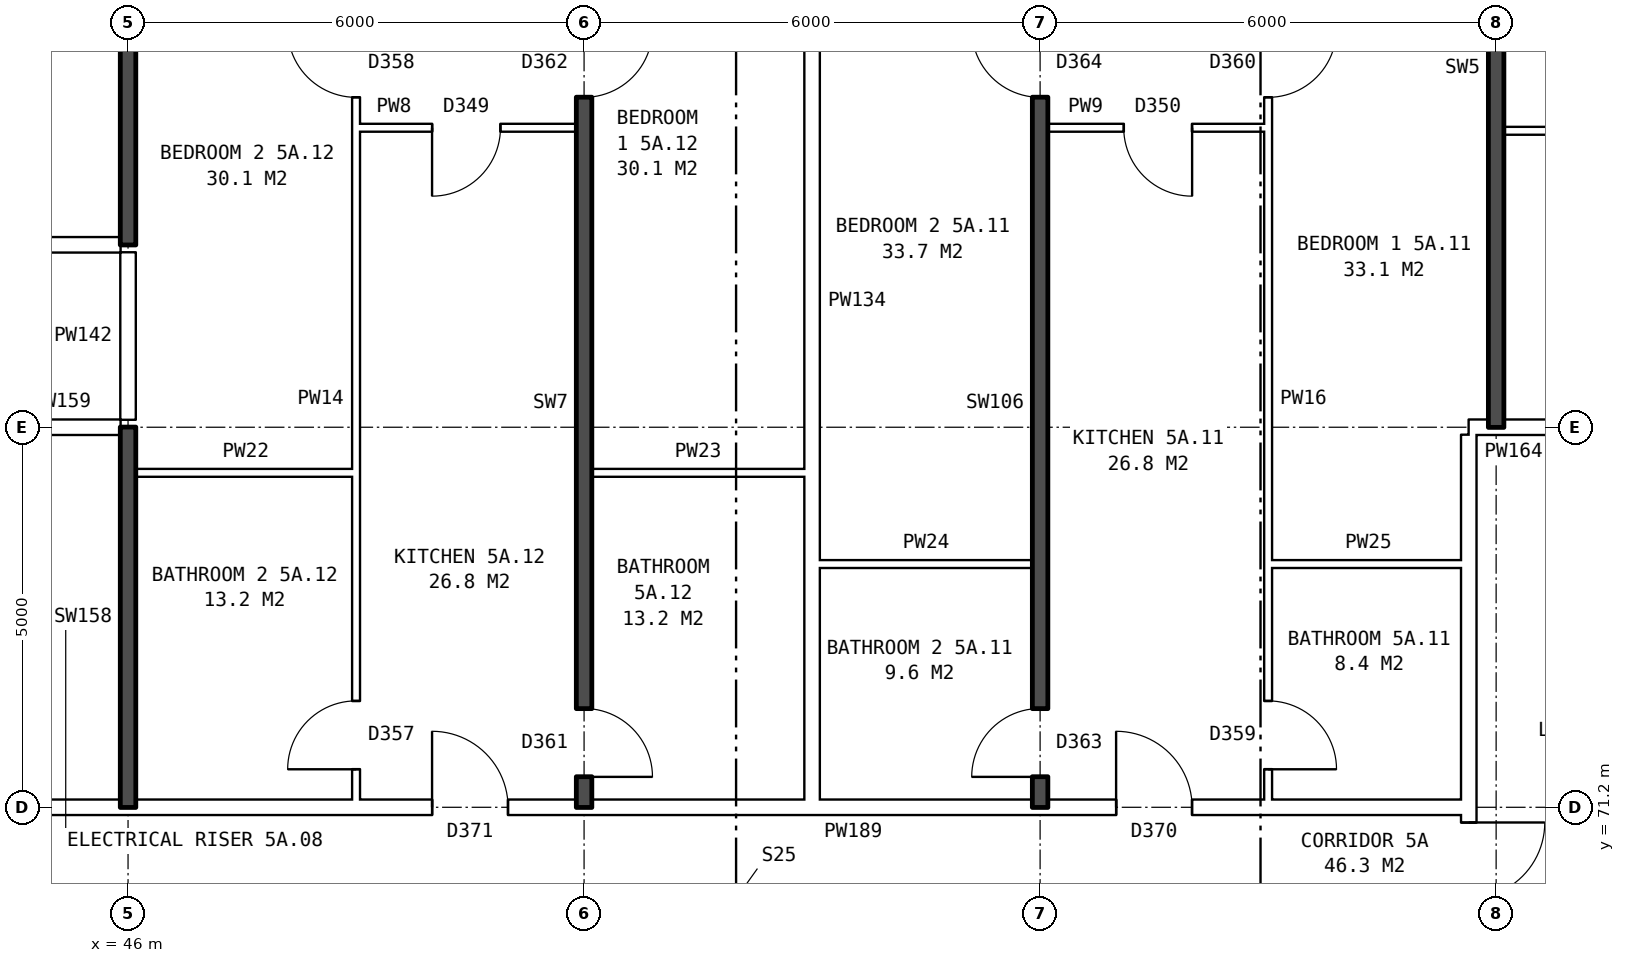
"""IFC4 building model, lengths in metres.
Left out: names, types, materials, properties, quantities, classifications, styles, units other than length and angle.
Written with IfcOpenShell. Run it as: python <this file> out.ifc"""

import sys

from ifc_helpers import new_model, si_unit, direction, frame, frame_2d, origin, place, context, subcontext, project, spatial, rectangle, extrude, element, fill, save


model = new_model("IFC4")
c1 = context("Model", 3, precision=1e-05, world=origin(), true_north=direction((0.0, 1.0)))
c2 = subcontext(c1, "Body", "Model", "MODEL_VIEW")
j1 = project(units=[si_unit("LENGTHUNIT", "METRE"), si_unit("PLANEANGLEUNIT", "RADIAN")], contexts=[c1])
p1 = place(None, origin())
s1 = spatial("IfcSite", under=j1, at=p1, CompositionType="ELEMENT")
p2 = place(p1, origin())
s2 = spatial("IfcBuilding", under=s1, at=p2, CompositionType="ELEMENT")
p3 = place(p2, frame((0.0, 0.0, 22.6)))
s3 = spatial("IfcBuildingStorey", under=s2, at=p3, CompositionType="ELEMENT", Elevation=22.6)
p4 = place(p3, frame((63.64, 63.9, 0.0), z_axis=(0.0, 0.0, 1.0), x_axis=(0.0, 1.0, 0.0)))
e1 = element("IfcWall", 1, at=p4, inside=s3, PredefinedType="PARTITIONING", context=c2, shape_type="SweptSolid", body=[
    extrude(rectangle(XDim=12.2, YDim=0.2, at=frame_2d((6.1, 0.0))), origin(), (0.0, 0.0, 1.0), 2.85),
])
p5 = place(p4, frame((5.1, 0.0, 0.0)))
e2 = element("IfcOpeningElement", 2, at=p5, cuts=e1, PredefinedType="OPENING", context=c2, shape_type="SweptSolid", body=[
    extrude(rectangle(XDim=2.0, YDim=2.1, at=frame_2d((1.0, 1.05))), frame((0.0, 0.11, 0.0), z_axis=(0.0, -1.0, 0.0), x_axis=(1.0, 0.0, 0.0)), (0.0, 0.0, 1.0), 0.22),
])
p6 = place(p3, frame((44.36, 71.2, 0.0), z_axis=(0.0, 0.0, 1.0), x_axis=(1.0, 0.0, 0.0)))
e3 = element("IfcWall", 3, at=p6, inside=s3, PredefinedType="PARTITIONING", context=c2, shape_type="SweptSolid", body=[
    extrude(rectangle(XDim=19.28, YDim=0.2, at=frame_2d((9.64, 0.0))), origin(), (0.0, 0.0, 1.0), 2.85),
])
p7 = place(p6, frame((14.64, 0.0, 0.0)))
e4 = element("IfcOpeningElement", 4, at=p7, cuts=e3, PredefinedType="OPENING", context=c2, shape_type="SweptSolid", body=[
    extrude(rectangle(XDim=1.0, YDim=2.1, at=frame_2d((0.5, 1.05))), frame((0.0, 0.11, 0.0), z_axis=(0.0, -1.0, 0.0), x_axis=(1.0, 0.0, 0.0)), (0.0, 0.0, 1.0), 0.22),
])
p8 = place(p6, frame((5.64, 0.0, 0.0)))
e5 = element("IfcOpeningElement", 5, at=p8, cuts=e3, PredefinedType="OPENING", context=c2, shape_type="SweptSolid", body=[
    extrude(rectangle(XDim=1.0, YDim=2.1, at=frame_2d((0.5, 1.05))), frame((0.0, 0.11, 0.0), z_axis=(0.0, -1.0, 0.0), x_axis=(1.0, 0.0, 0.0)), (0.0, 0.0, 1.0), 0.22),
])
p9 = place(p3, frame((55.1, 74.4, 0.0), z_axis=(0.0, 0.0, 1.0), x_axis=(1.0, 0.0, 0.0)))
e6 = element("IfcWall", 6, at=p9, inside=s3, PredefinedType="PARTITIONING", context=c2, shape_type="SweptSolid", body=[
    extrude(rectangle(XDim=2.8, YDim=0.1, at=frame_2d((1.4, 0.0))), origin(), (0.0, 0.0, 1.0), 2.85),
])
p10 = place(p3, frame((61.0, 74.4, 0.0), z_axis=(0.0, 0.0, 1.0), x_axis=(1.0, 0.0, 0.0)))
e7 = element("IfcWall", 7, at=p10, inside=s3, PredefinedType="PARTITIONING", context=c2, shape_type="SweptSolid", body=[
    extrude(rectangle(XDim=2.64, YDim=0.1, at=frame_2d((1.32, 0.0))), origin(), (0.0, 0.0, 1.0), 2.85),
])
p11 = place(p3, frame((46.1, 75.6, 0.0), z_axis=(0.0, 0.0, 1.0), x_axis=(1.0, 0.0, 0.0)))
e8 = element("IfcWall", 8, at=p11, inside=s3, PredefinedType="PARTITIONING", context=c2, shape_type="SweptSolid", body=[
    extrude(rectangle(XDim=2.9, YDim=0.1, at=frame_2d((1.45, 0.0))), origin(), (0.0, 0.0, 1.0), 2.85),
])
p12 = place(p3, frame((52.1, 75.6, 0.0), z_axis=(0.0, 0.0, 1.0), x_axis=(1.0, 0.0, 0.0)))
e9 = element("IfcWall", 9, at=p12, inside=s3, PredefinedType="PARTITIONING", context=c2, shape_type="SweptSolid", body=[
    extrude(rectangle(XDim=2.8, YDim=0.1, at=frame_2d((1.4, 0.0))), origin(), (0.0, 0.0, 1.0), 2.85),
])
p13 = place(p3, frame((44.36, 76.2, 0.0), z_axis=(0.0, 0.0, 1.0), x_axis=(1.0, 0.0, 0.0)))
e10 = element("IfcWall", 10, at=p13, inside=s3, PredefinedType="PARTITIONING", context=c2, shape_type="SweptSolid", body=[
    extrude(rectangle(XDim=1.54, YDim=0.2, at=frame_2d((0.77, 0.0))), origin(), (0.0, 0.0, 1.0), 2.85),
])
p14 = place(p3, frame((63.64, 76.2, 0.0), z_axis=(0.0, 0.0, 1.0), x_axis=(1.0, 0.0, 0.0)))
e11 = element("IfcWall", 11, at=p14, inside=s3, PredefinedType="PARTITIONING", context=c2, shape_type="SweptSolid", body=[
    extrude(rectangle(XDim=3.0, YDim=0.2, at=frame_2d((1.5, 0.0))), origin(), (0.0, 0.0, 1.0), 2.85),
])
p15 = place(p14, frame((1.18, 0.0, 0.0)))
e12 = element("IfcOpeningElement", 12, at=p15, cuts=e11, PredefinedType="OPENING", context=c2, shape_type="SweptSolid", body=[
    extrude(rectangle(XDim=1.0, YDim=2.1, at=frame_2d((0.5, 1.05))), frame((0.0, 0.11, 0.0), z_axis=(0.0, -1.0, 0.0), x_axis=(1.0, 0.0, 0.0)), (0.0, 0.0, 1.0), 0.22),
])
p16 = place(p3, frame((20.11, 78.6, 0.0), z_axis=(0.0, 0.0, 1.0), x_axis=(1.0, 0.0, 0.0)))
e13 = element("IfcWall", 13, at=p16, inside=s3, PredefinedType="PARTITIONING", context=c2, shape_type="SweptSolid", body=[
    extrude(rectangle(XDim=25.79, YDim=0.2, at=frame_2d((12.895, 0.0))), origin(), (0.0, 0.0, 1.0), 2.85),
])
p17 = place(p16, frame((22.34, 0.0, 0.0)))
e14 = element("IfcOpeningElement", 14, at=p17, cuts=e13, PredefinedType="OPENING", context=c2, shape_type="SweptSolid", body=[
    extrude(rectangle(XDim=1.0, YDim=2.1, at=frame_2d((0.5, 1.05))), frame((0.0, 0.11, 0.0), z_axis=(0.0, -1.0, 0.0), x_axis=(1.0, 0.0, 0.0)), (0.0, 0.0, 1.0), 0.22),
])
p18 = place(p16, frame((10.39, 0.0, 0.0)))
e15 = element("IfcOpeningElement", 15, at=p18, cuts=e13, PredefinedType="OPENING", context=c2, shape_type="SweptSolid", body=[
    extrude(rectangle(XDim=1.0, YDim=2.1, at=frame_2d((0.5, 1.05))), frame((0.0, 0.11, 0.0), z_axis=(0.0, -1.0, 0.0), x_axis=(1.0, 0.0, 0.0)), (0.0, 0.0, 1.0), 0.22),
])
p19 = place(p16, frame((2.245, 0.0, 0.0)))
e16 = element("IfcOpeningElement", 16, at=p19, cuts=e13, PredefinedType="OPENING", context=c2, shape_type="SweptSolid", body=[
    extrude(rectangle(XDim=1.0, YDim=2.1, at=frame_2d((0.5, 1.05))), frame((0.0, 0.11, 0.0), z_axis=(0.0, -1.0, 0.0), x_axis=(1.0, 0.0, 0.0)), (0.0, 0.0, 1.0), 0.22),
])
p20 = place(p3, frame((64.1, 80.1, 0.0), z_axis=(0.0, 0.0, 1.0), x_axis=(1.0, 0.0, 0.0)))
e17 = element("IfcWall", 17, at=p20, inside=s3, PredefinedType="PARTITIONING", context=c2, shape_type="SweptSolid", body=[
    extrude(rectangle(XDim=5.8, YDim=0.1, at=frame_2d((2.9, 0.0))), origin(), (0.0, 0.0, 1.0), 2.85),
])
p21 = place(p20, frame((3.6, 0.0, 0.0)))
e18 = element("IfcOpeningElement", 18, at=p21, cuts=e17, PredefinedType="OPENING", context=c2, shape_type="SweptSolid", body=[
    extrude(rectangle(XDim=0.9, YDim=2.1, at=frame_2d((0.45, 1.05))), frame((0.0, 0.06, 0.0), z_axis=(0.0, -1.0, 0.0), x_axis=(1.0, 0.0, 0.0)), (0.0, 0.0, 1.0), 0.12),
])
p22 = place(p20, frame((0.7, 0.0, 0.0)))
e19 = element("IfcOpeningElement", 19, at=p22, cuts=e17, PredefinedType="OPENING", context=c2, shape_type="SweptSolid", body=[
    extrude(rectangle(XDim=0.9, YDim=2.1, at=frame_2d((0.45, 1.05))), frame((0.0, 0.06, 0.0), z_axis=(0.0, -1.0, 0.0), x_axis=(1.0, 0.0, 0.0)), (0.0, 0.0, 1.0), 0.12),
])
p23 = place(p3, frame((49.0, 80.14, 0.0), z_axis=(0.0, 0.0, 1.0), x_axis=(1.0, 0.0, 0.0)))
e20 = element("IfcWall", 20, at=p23, inside=s3, PredefinedType="PARTITIONING", context=c2, shape_type="SweptSolid", body=[
    extrude(rectangle(XDim=2.9, YDim=0.1, at=frame_2d((1.45, 0.0))), origin(), (0.0, 0.0, 1.0), 2.85),
])
p24 = place(p23, frame((1.0, 0.0, 0.0)))
e21 = element("IfcOpeningElement", 21, at=p24, cuts=e20, PredefinedType="OPENING", context=c2, shape_type="SweptSolid", body=[
    extrude(rectangle(XDim=0.9, YDim=2.1, at=frame_2d((0.45, 1.05))), frame((0.0, 0.06, 0.0), z_axis=(0.0, -1.0, 0.0), x_axis=(1.0, 0.0, 0.0)), (0.0, 0.0, 1.0), 0.12),
])
p25 = place(p3, frame((58.1, 80.14, 0.0), z_axis=(0.0, 0.0, 1.0), x_axis=(1.0, 0.0, 0.0)))
e22 = element("IfcWall", 22, at=p25, inside=s3, PredefinedType="PARTITIONING", context=c2, shape_type="SweptSolid", body=[
    extrude(rectangle(XDim=2.9, YDim=0.1, at=frame_2d((1.45, 0.0))), origin(), (0.0, 0.0, 1.0), 2.85),
])
p26 = place(p25, frame((1.0, 0.0, 0.0)))
e23 = element("IfcOpeningElement", 23, at=p26, cuts=e22, PredefinedType="OPENING", context=c2, shape_type="SweptSolid", body=[
    extrude(rectangle(XDim=0.9, YDim=2.1, at=frame_2d((0.45, 1.05))), frame((0.0, 0.06, 0.0), z_axis=(0.0, -1.0, 0.0), x_axis=(1.0, 0.0, 0.0)), (0.0, 0.0, 1.0), 0.12),
])
p27 = place(p3, frame((46.0, 71.2, 0.0), z_axis=(0.0, 0.0, 1.0), x_axis=(0.0, 1.0, 0.0)))
e24 = element("IfcWall", 24, at=p27, inside=s3, PredefinedType="SOLIDWALL", context=c2, shape_type="SweptSolid", body=[
    extrude(rectangle(XDim=5.0, YDim=0.2, at=frame_2d((2.5, 0.0))), origin(), (0.0, 0.0, 1.0), 2.85),
])
p28 = place(p3, frame((46.0, 76.3, 0.0), z_axis=(0.0, 0.0, 1.0), x_axis=(0.0, 1.0, 0.0)))
e25 = element("IfcWall", 25, at=p28, inside=s3, PredefinedType="PARTITIONING", context=c2, shape_type="SweptSolid", body=[
    extrude(rectangle(XDim=2.2, YDim=0.2, at=frame_2d((1.1, 0.0))), origin(), (0.0, 0.0, 1.0), 2.85),
])
p29 = place(p3, frame((46.0, 78.6, 0.0), z_axis=(0.0, 0.0, 1.0), x_axis=(0.0, 1.0, 0.0)))
e26 = element("IfcWall", 26, at=p29, inside=s3, PredefinedType="SOLIDWALL", context=c2, shape_type="SweptSolid", body=[
    extrude(rectangle(XDim=7.04, YDim=0.2, at=frame_2d((3.52, 0.0))), origin(), (0.0, 0.0, 1.0), 2.85),
])
p30 = place(p3, frame((49.0, 71.3, 0.0), z_axis=(0.0, 0.0, 1.0), x_axis=(0.0, 1.0, 0.0)))
e27 = element("IfcWall", 27, at=p30, inside=s3, PredefinedType="PARTITIONING", context=c2, shape_type="SweptSolid", body=[
    extrude(rectangle(XDim=14.34, YDim=0.1, at=frame_2d((7.17, 0.0))), origin(), (0.0, 0.0, 1.0), 2.85),
])
p31 = place(p30, frame((9.24, 0.0, 0.0)))
e28 = element("IfcOpeningElement", 28, at=p31, cuts=e27, PredefinedType="OPENING", context=c2, shape_type="SweptSolid", body=[
    extrude(rectangle(XDim=0.9, YDim=2.1, at=frame_2d((0.45, 1.05))), frame((0.0, 0.06, 0.0), z_axis=(0.0, -1.0, 0.0), x_axis=(1.0, 0.0, 0.0)), (0.0, 0.0, 1.0), 0.12),
])
p32 = place(p30, frame((0.4, 0.0, 0.0)))
e29 = element("IfcOpeningElement", 29, at=p32, cuts=e27, PredefinedType="OPENING", context=c2, shape_type="SweptSolid", body=[
    extrude(rectangle(XDim=0.9, YDim=2.1, at=frame_2d((0.45, 1.05))), frame((0.0, 0.06, 0.0), z_axis=(0.0, -1.0, 0.0), x_axis=(1.0, 0.0, 0.0)), (0.0, 0.0, 1.0), 0.12),
])
p33 = place(p3, frame((52.0, 71.2, 0.0), z_axis=(0.0, 0.0, 1.0), x_axis=(0.0, 1.0, 0.0)))
e30 = element("IfcWall", 30, at=p33, inside=s3, PredefinedType="SOLIDWALL", context=c2, shape_type="SweptSolid", body=[
    extrude(rectangle(XDim=14.44, YDim=0.2, at=frame_2d((7.22, 0.0))), origin(), (0.0, 0.0, 1.0), 2.85),
])
p34 = place(p33, frame((9.34, 0.0, 0.0)))
e31 = element("IfcOpeningElement", 31, at=p34, cuts=e30, PredefinedType="OPENING", context=c2, shape_type="SweptSolid", body=[
    extrude(rectangle(XDim=0.9, YDim=2.1, at=frame_2d((0.45, 1.05))), frame((0.0, 0.11, 0.0), z_axis=(0.0, -1.0, 0.0), x_axis=(1.0, 0.0, 0.0)), (0.0, 0.0, 1.0), 0.22),
])
p35 = place(p33, frame((0.4, 0.0, 0.0)))
e32 = element("IfcOpeningElement", 32, at=p35, cuts=e30, PredefinedType="OPENING", context=c2, shape_type="SweptSolid", body=[
    extrude(rectangle(XDim=0.9, YDim=2.1, at=frame_2d((0.45, 1.05))), frame((0.0, 0.11, 0.0), z_axis=(0.0, -1.0, 0.0), x_axis=(1.0, 0.0, 0.0)), (0.0, 0.0, 1.0), 0.22),
])
p36 = place(p3, frame((55.0, 71.3, 0.0), z_axis=(0.0, 0.0, 1.0), x_axis=(0.0, 1.0, 0.0)))
e33 = element("IfcWall", 33, at=p36, inside=s3, PredefinedType="PARTITIONING", context=c2, shape_type="SweptSolid", body=[
    extrude(rectangle(XDim=14.34, YDim=0.2, at=frame_2d((7.17, 0.0))), origin(), (0.0, 0.0, 1.0), 2.85),
])
p37 = place(p3, frame((58.0, 71.2, 0.0), z_axis=(0.0, 0.0, 1.0), x_axis=(0.0, 1.0, 0.0)))
e34 = element("IfcWall", 34, at=p37, inside=s3, PredefinedType="SOLIDWALL", context=c2, shape_type="SweptSolid", body=[
    extrude(rectangle(XDim=14.44, YDim=0.2, at=frame_2d((7.22, 0.0))), origin(), (0.0, 0.0, 1.0), 2.85),
])
p38 = place(p37, frame((9.34, 0.0, 0.0)))
e35 = element("IfcOpeningElement", 35, at=p38, cuts=e34, PredefinedType="OPENING", context=c2, shape_type="SweptSolid", body=[
    extrude(rectangle(XDim=0.9, YDim=2.1, at=frame_2d((0.45, 1.05))), frame((0.0, 0.11, 0.0), z_axis=(0.0, -1.0, 0.0), x_axis=(1.0, 0.0, 0.0)), (0.0, 0.0, 1.0), 0.22),
])
p39 = place(p37, frame((0.4, 0.0, 0.0)))
e36 = element("IfcOpeningElement", 36, at=p39, cuts=e34, PredefinedType="OPENING", context=c2, shape_type="SweptSolid", body=[
    extrude(rectangle(XDim=0.9, YDim=2.1, at=frame_2d((0.45, 1.05))), frame((0.0, 0.11, 0.0), z_axis=(0.0, -1.0, 0.0), x_axis=(1.0, 0.0, 0.0)), (0.0, 0.0, 1.0), 0.22),
])
p40 = place(p3, frame((61.0, 71.3, 0.0), z_axis=(0.0, 0.0, 1.0), x_axis=(0.0, 1.0, 0.0)))
e37 = element("IfcWall", 37, at=p40, inside=s3, PredefinedType="PARTITIONING", context=c2, shape_type="SweptSolid", body=[
    extrude(rectangle(XDim=14.34, YDim=0.1, at=frame_2d((7.17, 0.0))), origin(), (0.0, 0.0, 1.0), 2.85),
])
p41 = place(p40, frame((9.24, 0.0, 0.0)))
e38 = element("IfcOpeningElement", 38, at=p41, cuts=e37, PredefinedType="OPENING", context=c2, shape_type="SweptSolid", body=[
    extrude(rectangle(XDim=0.9, YDim=2.1, at=frame_2d((0.45, 1.05))), frame((0.0, 0.06, 0.0), z_axis=(0.0, -1.0, 0.0), x_axis=(1.0, 0.0, 0.0)), (0.0, 0.0, 1.0), 0.12),
])
p42 = place(p40, frame((0.4, 0.0, 0.0)))
e39 = element("IfcOpeningElement", 39, at=p42, cuts=e37, PredefinedType="OPENING", context=c2, shape_type="SweptSolid", body=[
    extrude(rectangle(XDim=0.9, YDim=2.1, at=frame_2d((0.45, 1.05))), frame((0.0, 0.06, 0.0), z_axis=(0.0, -1.0, 0.0), x_axis=(1.0, 0.0, 0.0)), (0.0, 0.0, 1.0), 0.12),
])
p43 = place(p3, frame((64.0, 76.2, 0.0), z_axis=(0.0, 0.0, 1.0), x_axis=(0.0, 1.0, 0.0)))
e40 = element("IfcWall", 40, at=p43, inside=s3, PredefinedType="SOLIDWALL", context=c2, shape_type="SweptSolid", body=[
    extrude(rectangle(XDim=9.44, YDim=0.2, at=frame_2d((4.72, 0.0))), origin(), (0.0, 0.0, 1.0), 2.85),
])
p44 = place(p5, frame((2.0, 0.0, 0.0), z_axis=(0.0, 0.0, 1.0), x_axis=(-1.0, 0.0, 0.0)))
e41 = element("IfcDoor", 41, at=p44, inside=s3, OperationType="DOUBLE_DOOR_SINGLE_SWING", PredefinedType="DOOR", context=c2, shape_type="SweptSolid", body=[
    extrude(rectangle(XDim=2.0, YDim=2.1, at=frame_2d((1.0, 1.05))), frame((0.0, 0.025, 0.0), z_axis=(0.0, -1.0, 0.0), x_axis=(1.0, 0.0, 0.0)), (0.0, 0.0, 1.0), 0.05),
])
fill(e2, e41)
p45 = place(p41, frame((0.9, 0.0, 0.0), z_axis=(0.0, 0.0, 1.0), x_axis=(-1.0, 0.0, 0.0)))
e42 = element("IfcDoor", 42, at=p45, inside=s3, OperationType="SINGLE_SWING_LEFT", PredefinedType="DOOR", context=c2, shape_type="SweptSolid", body=[
    extrude(rectangle(XDim=0.9, YDim=2.1, at=frame_2d((0.45, 1.05))), frame((0.0, 0.025, 0.0), z_axis=(0.0, -1.0, 0.0), x_axis=(1.0, 0.0, 0.0)), (0.0, 0.0, 1.0), 0.05),
])
fill(e38, e42)
p46 = place(p38, origin())
e43 = element("IfcDoor", 43, at=p46, inside=s3, OperationType="SINGLE_SWING_RIGHT", PredefinedType="DOOR", context=c2, shape_type="SweptSolid", body=[
    extrude(rectangle(XDim=0.9, YDim=2.1, at=frame_2d((0.45, 1.05))), frame((0.0, 0.025, 0.0), z_axis=(0.0, -1.0, 0.0), x_axis=(1.0, 0.0, 0.0)), (0.0, 0.0, 1.0), 0.05),
])
fill(e35, e43)
p47 = place(p7, origin())
e44 = element("IfcDoor", 44, at=p47, inside=s3, OperationType="SINGLE_SWING_LEFT", PredefinedType="DOOR", context=c2, shape_type="SweptSolid", body=[
    extrude(rectangle(XDim=1.0, YDim=2.1, at=frame_2d((0.5, 1.05))), frame((0.0, 0.025, 0.0), z_axis=(0.0, -1.0, 0.0), x_axis=(1.0, 0.0, 0.0)), (0.0, 0.0, 1.0), 0.05),
])
fill(e4, e44)
p48 = place(p26, frame((0.9, 0.0, 0.0), z_axis=(0.0, 0.0, 1.0), x_axis=(-1.0, 0.0, 0.0)))
e45 = element("IfcDoor", 45, at=p48, inside=s3, OperationType="SINGLE_SWING_LEFT", PredefinedType="DOOR", context=c2, shape_type="SweptSolid", body=[
    extrude(rectangle(XDim=0.9, YDim=2.1, at=frame_2d((0.45, 1.05))), frame((0.0, 0.025, 0.0), z_axis=(0.0, -1.0, 0.0), x_axis=(1.0, 0.0, 0.0)), (0.0, 0.0, 1.0), 0.05),
])
fill(e23, e45)
p49 = place(p42, frame((0.9, 0.0, 0.0), z_axis=(0.0, 0.0, 1.0), x_axis=(-1.0, 0.0, 0.0)))
e46 = element("IfcDoor", 46, at=p49, inside=s3, OperationType="SINGLE_SWING_RIGHT", PredefinedType="DOOR", context=c2, shape_type="SweptSolid", body=[
    extrude(rectangle(XDim=0.9, YDim=2.1, at=frame_2d((0.45, 1.05))), frame((0.0, 0.025, 0.0), z_axis=(0.0, -1.0, 0.0), x_axis=(1.0, 0.0, 0.0)), (0.0, 0.0, 1.0), 0.05),
])
fill(e39, e46)
p50 = place(p39, origin())
e47 = element("IfcDoor", 47, at=p50, inside=s3, OperationType="SINGLE_SWING_LEFT", PredefinedType="DOOR", context=c2, shape_type="SweptSolid", body=[
    extrude(rectangle(XDim=0.9, YDim=2.1, at=frame_2d((0.45, 1.05))), frame((0.0, 0.025, 0.0), z_axis=(0.0, -1.0, 0.0), x_axis=(1.0, 0.0, 0.0)), (0.0, 0.0, 1.0), 0.05),
])
fill(e36, e47)
p51 = place(p34, frame((0.9, 0.0, 0.0), z_axis=(0.0, 0.0, 1.0), x_axis=(-1.0, 0.0, 0.0)))
e48 = element("IfcDoor", 48, at=p51, inside=s3, OperationType="SINGLE_SWING_LEFT", PredefinedType="DOOR", context=c2, shape_type="SweptSolid", body=[
    extrude(rectangle(XDim=0.9, YDim=2.1, at=frame_2d((0.45, 1.05))), frame((0.0, 0.025, 0.0), z_axis=(0.0, -1.0, 0.0), x_axis=(1.0, 0.0, 0.0)), (0.0, 0.0, 1.0), 0.05),
])
fill(e31, e48)
p52 = place(p31, origin())
e49 = element("IfcDoor", 49, at=p52, inside=s3, OperationType="SINGLE_SWING_RIGHT", PredefinedType="DOOR", context=c2, shape_type="SweptSolid", body=[
    extrude(rectangle(XDim=0.9, YDim=2.1, at=frame_2d((0.45, 1.05))), frame((0.0, 0.025, 0.0), z_axis=(0.0, -1.0, 0.0), x_axis=(1.0, 0.0, 0.0)), (0.0, 0.0, 1.0), 0.05),
])
fill(e28, e49)
p53 = place(p8, origin())
e50 = element("IfcDoor", 50, at=p53, inside=s3, OperationType="SINGLE_SWING_LEFT", PredefinedType="DOOR", context=c2, shape_type="SweptSolid", body=[
    extrude(rectangle(XDim=1.0, YDim=2.1, at=frame_2d((0.5, 1.05))), frame((0.0, 0.025, 0.0), z_axis=(0.0, -1.0, 0.0), x_axis=(1.0, 0.0, 0.0)), (0.0, 0.0, 1.0), 0.05),
])
fill(e5, e50)
p54 = place(p24, frame((0.9, 0.0, 0.0), z_axis=(0.0, 0.0, 1.0), x_axis=(-1.0, 0.0, 0.0)))
e51 = element("IfcDoor", 51, at=p54, inside=s3, OperationType="SINGLE_SWING_RIGHT", PredefinedType="DOOR", context=c2, shape_type="SweptSolid", body=[
    extrude(rectangle(XDim=0.9, YDim=2.1, at=frame_2d((0.45, 1.05))), frame((0.0, 0.025, 0.0), z_axis=(0.0, -1.0, 0.0), x_axis=(1.0, 0.0, 0.0)), (0.0, 0.0, 1.0), 0.05),
])
fill(e21, e51)
p55 = place(p35, frame((0.9, 0.0, 0.0), z_axis=(0.0, 0.0, 1.0), x_axis=(-1.0, 0.0, 0.0)))
e52 = element("IfcDoor", 52, at=p55, inside=s3, OperationType="SINGLE_SWING_RIGHT", PredefinedType="DOOR", context=c2, shape_type="SweptSolid", body=[
    extrude(rectangle(XDim=0.9, YDim=2.1, at=frame_2d((0.45, 1.05))), frame((0.0, 0.025, 0.0), z_axis=(0.0, -1.0, 0.0), x_axis=(1.0, 0.0, 0.0)), (0.0, 0.0, 1.0), 0.05),
])
fill(e32, e52)
p56 = place(p32, origin())
e53 = element("IfcDoor", 53, at=p56, inside=s3, OperationType="SINGLE_SWING_LEFT", PredefinedType="DOOR", context=c2, shape_type="SweptSolid", body=[
    extrude(rectangle(XDim=0.9, YDim=2.1, at=frame_2d((0.45, 1.05))), frame((0.0, 0.025, 0.0), z_axis=(0.0, -1.0, 0.0), x_axis=(1.0, 0.0, 0.0)), (0.0, 0.0, 1.0), 0.05),
])
fill(e29, e53)
save(model, sys.argv[1])
